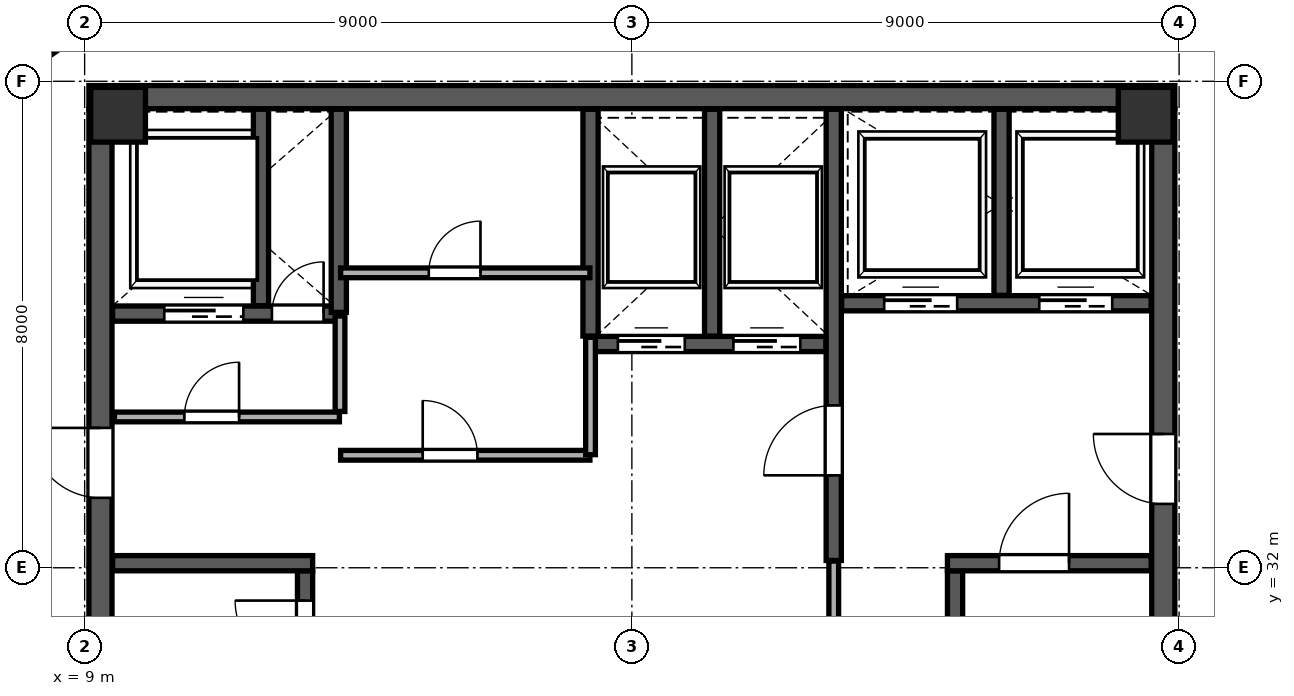
"""IFC4 building model, lengths in metres.
Left out: names, types, materials, properties, quantities, classifications, styles, units other than length and angle.
Written with IfcOpenShell. Run it as: python <this file> out.ifc"""

import sys

from ifc_helpers import new_model, si_unit, direction, frame, frame_2d, origin, origin_2d, place, context, subcontext, project, spatial, rectangle, extrude, source, transform, mapped, element, fill, save


model = new_model("IFC4")
c1 = context("Model", 3, precision=1e-05, world=origin(), true_north=direction((0.0, 1.0)))
c2 = subcontext(c1, "Body", "Model", "MODEL_VIEW")
j1 = project(units=[si_unit("LENGTHUNIT", "METRE"), si_unit("PLANEANGLEUNIT", "RADIAN")], contexts=[c1])
p1 = place(None, origin())
s1 = spatial("IfcSite", under=j1, at=p1, CompositionType="ELEMENT")
p2 = place(p1, origin())
s2 = spatial("IfcBuilding", under=s1, at=p2, CompositionType="ELEMENT")
p3 = place(p2, frame((0.0, 0.0, 298.8)))
s3 = spatial("IfcBuildingStorey", under=s2, at=p3, CompositionType="ELEMENT", Elevation=298.8)
m1 = source(origin(), c2, "Body", "SweptSolid", [
    extrude(rectangle(XDim=0.9, YDim=0.9, at=origin_2d()), origin(), (0.0, 0.0, 1.0), 4.198),
])
for number, where, z_axis, x_axis in (
    (1, (9.55, 39.45, 0.001), (0.0, 0.0, 1.0), (1.0, 0.0, 0.0)),
    (2, (26.45, 39.45, 0.001), (0.0, 0.0, 1.0), (1.0, 0.0, 0.0)),
):
    element("IfcColumn", number, at=place(p3, frame(where, z_axis=z_axis, x_axis=x_axis)), inside=s3, PredefinedType="COLUMN", context=c2, shape_type="MappedRepresentation", body=[
        mapped(m1, transform((0.0, 0.0, 0.0), scale=1.0)),
    ])
p4 = place(p3, frame((9.26, 24.45, 0.0), z_axis=(0.0, 0.0, 1.0), x_axis=(0.0, 1.0, 0.0)))
e3 = element("IfcWall", 3, at=p4, inside=s3, PredefinedType="SHEAR", context=c2, shape_type="SweptSolid", body=[
    extrude(rectangle(XDim=15.1, YDim=0.38, at=frame_2d((7.55, 0.0))), origin(), (0.0, 0.0, 1.0), 3.96),
])
p5 = place(p4, frame((8.7, 0.0, 0.0)))
e4 = element("IfcOpeningElement", 4, at=p5, cuts=e3, PredefinedType="OPENING", context=c2, shape_type="SweptSolid", body=[
    extrude(rectangle(XDim=1.15, YDim=2.2, at=frame_2d((0.575, 1.1))), frame((0.0, 0.2, 0.0), z_axis=(0.0, -1.0, 0.0), x_axis=(1.0, 0.0, 0.0)), (0.0, 0.0, 1.0), 0.4),
])
p6 = place(p3, frame((26.74, 24.45, 0.0), z_axis=(0.0, 0.0, 1.0), x_axis=(0.0, 1.0, 0.0)))
e5 = element("IfcWall", 5, at=p6, inside=s3, PredefinedType="SHEAR", context=c2, shape_type="SweptSolid", body=[
    extrude(rectangle(XDim=15.1, YDim=0.38, at=frame_2d((7.55, 0.0))), origin(), (0.0, 0.0, 1.0), 3.96),
])
p7 = place(p6, frame((8.6, 0.0, 0.0)))
e6 = element("IfcOpeningElement", 6, at=p7, cuts=e5, PredefinedType="OPENING", context=c2, shape_type="SweptSolid", body=[
    extrude(rectangle(XDim=1.15, YDim=2.2, at=frame_2d((0.575, 1.1))), frame((0.0, 0.2, 0.0), z_axis=(0.0, -1.0, 0.0), x_axis=(1.0, 0.0, 0.0)), (0.0, 0.0, 1.0), 0.4),
])
p8 = place(p3, frame((9.07, 39.74, 0.0), z_axis=(0.0, 0.0, 1.0), x_axis=(1.0, 0.0, 0.0)))
e7 = element("IfcWall", 7, at=p8, inside=s3, PredefinedType="SHEAR", context=c2, shape_type="SweptSolid", body=[
    extrude(rectangle(XDim=17.86, YDim=0.38, at=frame_2d((8.93, 0.0))), origin(), (0.0, 0.0, 1.0), 3.96),
])
p9 = place(p3, frame((12.625, 24.46, 0.0), z_axis=(0.0, 0.0, 1.0), x_axis=(0.0, 1.0, 0.0)))
e8 = element("IfcWall", 8, at=p9, inside=s3, PredefinedType="SHEAR", context=c2, shape_type="SweptSolid", body=[
    extrude(rectangle(XDim=7.49, YDim=0.25, at=frame_2d((3.745, 0.0))), origin(), (0.0, 0.0, 1.0), 3.96),
])
p10 = place(p9, frame((5.85, 0.0, 0.0)))
e9 = element("IfcOpeningElement", 9, at=p10, cuts=e8, PredefinedType="OPENING", context=c2, shape_type="SweptSolid", body=[
    extrude(rectangle(XDim=1.15, YDim=2.2, at=frame_2d((0.575, 1.1))), frame((0.0, 0.135, 0.0), z_axis=(0.0, -1.0, 0.0), x_axis=(1.0, 0.0, 0.0)), (0.0, 0.0, 1.0), 0.27),
])
p11 = place(p3, frame((9.46, 32.075, 0.0), z_axis=(0.0, 0.0, 1.0), x_axis=(1.0, 0.0, 0.0)))
e10 = element("IfcWall", 10, at=p11, inside=s3, PredefinedType="SHEAR", context=c2, shape_type="SweptSolid", body=[
    extrude(rectangle(XDim=3.29, YDim=0.25, at=frame_2d((1.645, 0.0))), origin(), (0.0, 0.0, 1.0), 3.96),
])
p12 = place(p3, frame((23.315, 24.46, 0.0), z_axis=(0.0, 0.0, 1.0), x_axis=(0.0, 1.0, 0.0)))
e11 = element("IfcWall", 11, at=p12, inside=s3, PredefinedType="SHEAR", context=c2, shape_type="SweptSolid", body=[
    extrude(rectangle(XDim=7.49, YDim=0.25, at=frame_2d((3.745, 0.0))), origin(), (0.0, 0.0, 1.0), 3.96),
])
p13 = place(p3, frame((23.19, 32.075, 0.0), z_axis=(0.0, 0.0, 1.0), x_axis=(1.0, 0.0, 0.0)))
e12 = element("IfcWall", 12, at=p13, inside=s3, PredefinedType="SHEAR", context=c2, shape_type="SweptSolid", body=[
    extrude(rectangle(XDim=3.35, YDim=0.25, at=frame_2d((1.675, 0.0))), origin(), (0.0, 0.0, 1.0), 3.96),
])
p14 = place(p13, frame((0.85, 0.0, 0.0)))
e13 = element("IfcOpeningElement", 13, at=p14, cuts=e12, PredefinedType="OPENING", context=c2, shape_type="SweptSolid", body=[
    extrude(rectangle(XDim=1.15, YDim=2.2, at=frame_2d((0.575, 1.1))), frame((0.0, 0.135, 0.0), z_axis=(0.0, -1.0, 0.0), x_axis=(1.0, 0.0, 0.0)), (0.0, 0.0, 1.0), 0.27),
])
p15 = place(p3, frame((21.32, 32.12, 0.0), z_axis=(0.0, 0.0, 1.0), x_axis=(0.0, 1.0, 0.0)))
e14 = element("IfcWall", 14, at=p15, inside=s3, PredefinedType="SHEAR", context=c2, shape_type="SweptSolid", body=[
    extrude(rectangle(XDim=7.42, YDim=0.25, at=frame_2d((3.71, 0.0))), origin(), (0.0, 0.0, 1.0), 3.96),
])
p16 = place(p15, frame((1.4, 0.0, 0.0)))
e15 = element("IfcOpeningElement", 15, at=p16, cuts=e14, PredefinedType="OPENING", context=c2, shape_type="SweptSolid", body=[
    extrude(rectangle(XDim=1.15, YDim=2.2, at=frame_2d((0.575, 1.1))), frame((0.0, 0.135, 0.0), z_axis=(0.0, -1.0, 0.0), x_axis=(1.0, 0.0, 0.0)), (0.0, 0.0, 1.0), 0.27),
])
p17 = place(p3, frame((9.46, 36.18, 0.0), z_axis=(0.0, 0.0, 1.0), x_axis=(1.0, 0.0, 0.0)))
e16 = element("IfcWall", 16, at=p17, inside=s3, PredefinedType="SHEAR", context=c2, shape_type="SweptSolid", body=[
    extrude(rectangle(XDim=3.79, YDim=0.25, at=frame_2d((1.895, 0.0))), origin(), (0.0, 0.0, 1.0), 3.96),
])
p18 = place(p17, frame((2.62, 0.0, 0.0)))
e17 = element("IfcOpeningElement", 17, at=p18, cuts=e16, PredefinedType="OPENING", context=c2, shape_type="SweptSolid", body=[
    extrude(rectangle(XDim=0.85, YDim=2.1, at=frame_2d((0.425, 1.05))), frame((0.0, 0.135, 0.0), z_axis=(0.0, -1.0, 0.0), x_axis=(1.0, 0.0, 0.0)), (0.0, 0.0, 1.0), 0.27),
])
p19 = place(p17, frame((0.85, 0.0, 0.0)))
e18 = element("IfcOpeningElement", 18, at=p19, cuts=e16, PredefinedType="OPENING", context=c2, shape_type="SweptSolid", body=[
    extrude(rectangle(XDim=1.3, YDim=2.25, at=frame_2d((0.65, 1.125))), frame((0.0, 0.135, 0.0), z_axis=(0.0, -1.0, 0.0), x_axis=(1.0, 0.0, 0.0)), (0.0, 0.0, 1.0), 0.27),
])
p20 = place(p3, frame((11.9, 36.31, 0.0), z_axis=(0.0, 0.0, 1.0), x_axis=(0.0, 1.0, 0.0)))
e19 = element("IfcWall", 19, at=p20, inside=s3, PredefinedType="SHEAR", context=c2, shape_type="SweptSolid", body=[
    extrude(rectangle(XDim=3.23, YDim=0.25, at=frame_2d((1.615, 0.0))), origin(), (0.0, 0.0, 1.0), 3.96),
])
p21 = place(p3, frame((21.45, 36.35, 0.0), z_axis=(0.0, 0.0, 1.0), x_axis=(1.0, 0.0, 0.0)))
e20 = element("IfcWall", 20, at=p21, inside=s3, PredefinedType="SHEAR", context=c2, shape_type="SweptSolid", body=[
    extrude(rectangle(XDim=5.09, YDim=0.25, at=frame_2d((2.545, 0.0))), origin(), (0.0, 0.0, 1.0), 3.96),
])
p22 = place(p21, frame((0.7, 0.0, 0.0)))
e21 = element("IfcOpeningElement", 21, at=p22, cuts=e20, PredefinedType="OPENING", context=c2, shape_type="SweptSolid", body=[
    extrude(rectangle(XDim=1.2, YDim=2.2, at=frame_2d((0.6, 1.1))), frame((0.0, 0.135, 0.0), z_axis=(0.0, -1.0, 0.0), x_axis=(1.0, 0.0, 0.0)), (0.0, 0.0, 1.0), 0.27),
])
p23 = place(p21, frame((3.25, 0.0, 0.0)))
e22 = element("IfcOpeningElement", 22, at=p23, cuts=e20, PredefinedType="OPENING", context=c2, shape_type="SweptSolid", body=[
    extrude(rectangle(XDim=1.2, YDim=2.2, at=frame_2d((0.6, 1.1))), frame((0.0, 0.135, 0.0), z_axis=(0.0, -1.0, 0.0), x_axis=(1.0, 0.0, 0.0)), (0.0, 0.0, 1.0), 0.27),
])
p24 = place(p3, frame((24.08, 36.48, 0.0), z_axis=(0.0, 0.0, 1.0), x_axis=(0.0, 1.0, 0.0)))
e23 = element("IfcWall", 23, at=p24, inside=s3, PredefinedType="SHEAR", context=c2, shape_type="SweptSolid", body=[
    extrude(rectangle(XDim=3.06, YDim=0.25, at=frame_2d((1.53, 0.0))), origin(), (0.0, 0.0, 1.0), 3.96),
])
p25 = place(p3, frame((13.18, 36.2, 0.0), z_axis=(0.0, 0.0, 1.0), x_axis=(0.0, 1.0, 0.0)))
e24 = element("IfcWall", 24, at=p25, inside=s3, PredefinedType="SHEAR", context=c2, shape_type="SweptSolid", body=[
    extrude(rectangle(XDim=3.34, YDim=0.25, at=frame_2d((1.67, 0.0))), origin(), (0.0, 0.0, 1.0), 3.96),
])
p26 = place(p3, frame((17.32, 35.68, 0.0), z_axis=(0.0, 0.0, 1.0), x_axis=(1.0, 0.0, 0.0)))
e25 = element("IfcWall", 25, at=p26, inside=s3, PredefinedType="SHEAR", context=c2, shape_type="SweptSolid", body=[
    extrude(rectangle(XDim=3.87, YDim=0.25, at=frame_2d((1.935, 0.0))), origin(), (0.0, 0.0, 1.0), 3.96),
])
p27 = place(p26, frame((0.45, 0.0, 0.0)))
e26 = element("IfcOpeningElement", 26, at=p27, cuts=e25, PredefinedType="OPENING", context=c2, shape_type="SweptSolid", body=[
    extrude(rectangle(XDim=1.1, YDim=2.2, at=frame_2d((0.55, 1.1))), frame((0.0, 0.135, 0.0), z_axis=(0.0, -1.0, 0.0), x_axis=(1.0, 0.0, 0.0)), (0.0, 0.0, 1.0), 0.27),
])
p28 = place(p26, frame((2.35, 0.0, 0.0)))
e27 = element("IfcOpeningElement", 27, at=p28, cuts=e25, PredefinedType="OPENING", context=c2, shape_type="SweptSolid", body=[
    extrude(rectangle(XDim=1.1, YDim=2.2, at=frame_2d((0.55, 1.1))), frame((0.0, 0.135, 0.0), z_axis=(0.0, -1.0, 0.0), x_axis=(1.0, 0.0, 0.0)), (0.0, 0.0, 1.0), 0.27),
])
for number, where, z_axis, x_axis in (
    (28, (17.32, 35.81, 0.0), (0.0, 0.0, 1.0), (0.0, 1.0, 0.0)),
    (29, (19.32, 35.81, 0.0), (0.0, 0.0, 1.0), (0.0, 1.0, 0.0)),
):
    element("IfcWall", number, at=place(p3, frame(where, z_axis=z_axis, x_axis=x_axis)), inside=s3, PredefinedType="SHEAR", context=c2, shape_type="SweptSolid", body=[
        extrude(rectangle(XDim=3.73, YDim=0.25, at=frame_2d((1.865, 0.0))), origin(), (0.0, 0.0, 1.0), 3.96),
    ])
p29 = place(p3, frame((9.49, 34.48, 0.0), z_axis=(0.0, 0.0, 1.0), x_axis=(1.0, 0.0, 0.0)))
e30 = element("IfcWall", 30, at=p29, inside=s3, PredefinedType="PARTITIONING", context=c2, shape_type="SweptSolid", body=[
    extrude(rectangle(XDim=3.7, YDim=0.16, at=frame_2d((1.85, 0.0))), origin(), (0.0, 0.0, 1.0), 3.96),
])
p30 = place(p29, frame((1.15, 0.0, 0.0)))
e31 = element("IfcOpeningElement", 31, at=p30, cuts=e30, PredefinedType="OPENING", context=c2, shape_type="SweptSolid", body=[
    extrude(rectangle(XDim=0.9, YDim=2.15, at=frame_2d((0.45, 1.075))), frame((0.0, 0.09, 0.0), z_axis=(0.0, -1.0, 0.0), x_axis=(1.0, 0.0, 0.0)), (0.0, 0.0, 1.0), 0.18),
])
p31 = place(p3, frame((13.2, 34.57, 0.0), z_axis=(0.0, 0.0, 1.0), x_axis=(0.0, 1.0, 0.0)))
e32 = element("IfcWall", 32, at=p31, inside=s3, PredefinedType="PARTITIONING", context=c2, shape_type="SweptSolid", body=[
    extrude(rectangle(XDim=1.57, YDim=0.16, at=frame_2d((0.785, 0.0))), origin(), (0.0, 0.0, 1.0), 3.96),
])
p32 = place(p3, frame((13.21, 33.85, 0.0), z_axis=(0.0, 0.0, 1.0), x_axis=(1.0, 0.0, 0.0)))
e33 = element("IfcWall", 33, at=p32, inside=s3, PredefinedType="PARTITIONING", context=c2, shape_type="SweptSolid", body=[
    extrude(rectangle(XDim=4.1, YDim=0.16, at=frame_2d((2.05, 0.0))), origin(), (0.0, 0.0, 1.0), 3.96),
])
p33 = place(p32, frame((1.35, 0.0, 0.0)))
e34 = element("IfcOpeningElement", 34, at=p33, cuts=e33, PredefinedType="OPENING", context=c2, shape_type="SweptSolid", body=[
    extrude(rectangle(XDim=0.9, YDim=2.15, at=frame_2d((0.45, 1.075))), frame((0.0, 0.09, 0.0), z_axis=(0.0, -1.0, 0.0), x_axis=(1.0, 0.0, 0.0)), (0.0, 0.0, 1.0), 0.18),
])
p34 = place(p3, frame((17.32, 33.86, 0.0), z_axis=(0.0, 0.0, 1.0), x_axis=(0.0, 1.0, 0.0)))
e35 = element("IfcWall", 35, at=p34, inside=s3, PredefinedType="PARTITIONING", context=c2, shape_type="SweptSolid", body=[
    extrude(rectangle(XDim=1.93, YDim=0.16, at=frame_2d((0.965, 0.0))), origin(), (0.0, 0.0, 1.0), 3.96),
])
p35 = place(p3, frame((13.21, 36.85, 0.0), z_axis=(0.0, 0.0, 1.0), x_axis=(1.0, 0.0, 0.0)))
e36 = element("IfcWall", 36, at=p35, inside=s3, PredefinedType="PARTITIONING", context=c2, shape_type="SweptSolid", body=[
    extrude(rectangle(XDim=4.1, YDim=0.16, at=frame_2d((2.05, 0.0))), origin(), (0.0, 0.0, 1.0), 3.96),
])
p36 = place(p35, frame((1.45, 0.0, 0.0)))
e37 = element("IfcOpeningElement", 37, at=p36, cuts=e36, PredefinedType="OPENING", context=c2, shape_type="SweptSolid", body=[
    extrude(rectangle(XDim=0.85, YDim=2.1, at=frame_2d((0.425, 1.05))), frame((0.0, 0.09, 0.0), z_axis=(0.0, -1.0, 0.0), x_axis=(1.0, 0.0, 0.0)), (0.0, 0.0, 1.0), 0.18),
])
p37 = place(p3, frame((21.32, 29.19, 0.0), z_axis=(0.0, 0.0, 1.0), x_axis=(0.0, 1.0, 0.0)))
e38 = element("IfcWall", 38, at=p37, inside=s3, PredefinedType="PARTITIONING", context=c2, shape_type="SweptSolid", body=[
    extrude(rectangle(XDim=2.92, YDim=0.16, at=frame_2d((1.46, 0.0))), origin(), (0.0, 0.0, 1.0), 3.96),
])
p38 = place(p3, frame((21.918, 49.884, 0.0), z_axis=(0.0, 0.0, 1.0), x_axis=(0.57358495776, -0.819146077468, 0.0)))
e39 = element("IfcWall", 39, at=p38, inside=s3, PredefinedType="PARTITIONING", context=c2, shape_type="SweptSolid", body=[
    extrude(rectangle(XDim=25.79, YDim=0.1, at=frame_2d((12.895, 0.0))), origin(), (0.0, 0.0, 1.0), 3.96),
])
p39 = place(p38, frame((9.2, 0.0, 0.0)))
e40 = element("IfcOpeningElement", 40, at=p39, cuts=e39, PredefinedType="OPENING", context=c2, shape_type="SweptSolid", body=[
    extrude(rectangle(XDim=0.95, YDim=2.15, at=frame_2d((0.475, 1.075))), frame((0.0, 0.06, 0.0), z_axis=(0.0, -1.0, 0.0), x_axis=(1.0, 0.0, 0.0)), (0.0, 0.0, 1.0), 0.12),
])
p40 = place(p3, frame((2.071, 36.036, 0.0), z_axis=(0.0, 0.0, 1.0), x_axis=(0.819154854942, 0.573572422302, 0.0)))
e41 = element("IfcWall", 41, at=p40, inside=s3, PredefinedType="PARTITIONING", context=c2, shape_type="SweptSolid", body=[
    extrude(rectangle(XDim=29.62, YDim=0.115, at=frame_2d((14.81, 0.0))), origin(), (0.0, 0.0, 1.0), 3.96),
])
p41 = place(p40, frame((4.2, 0.0, 0.0)))
e42 = element("IfcOpeningElement", 42, at=p41, cuts=e41, PredefinedType="OPENING", context=c2, shape_type="SweptSolid", body=[
    extrude(rectangle(XDim=0.95, YDim=2.15, at=frame_2d((0.475, 1.075))), frame((0.0, 0.067, 0.0), z_axis=(0.0, -1.0, 0.0), x_axis=(1.0, 0.0, 0.0)), (0.0, 0.0, 1.0), 0.135),
])
m2 = source(origin(), c2, "Body", "SweptSolid", [
    extrude(rectangle(XDim=1.15, YDim=2.2, at=frame_2d((0.575, 1.1))), frame((0.0, 0.025, 0.0), z_axis=(0.0, -1.0, 0.0), x_axis=(1.0, 0.0, 0.0)), (0.0, 0.0, 1.0), 0.05),
])
p42 = place(p10, origin())
e43 = element("IfcDoor", 43, at=p42, inside=s3, OperationType="SINGLE_SWING_RIGHT", PredefinedType="DOOR", context=c2, shape_type="MappedRepresentation", body=[
    mapped(m2, transform((0.0, 0.0, 0.0), scale=1.0)),
])
fill(e9, e43)
m3 = source(origin(), c2, "Body", "SweptSolid", [
    extrude(rectangle(XDim=1.15, YDim=2.2, at=frame_2d((0.575, 1.1))), frame((0.0, 0.025, 0.0), z_axis=(0.0, -1.0, 0.0), x_axis=(1.0, 0.0, 0.0)), (0.0, 0.0, 1.0), 0.05),
])
p43 = place(p16, origin())
e44 = element("IfcDoor", 44, at=p43, inside=s3, OperationType="SINGLE_SWING_LEFT", PredefinedType="DOOR", context=c2, shape_type="MappedRepresentation", body=[
    mapped(m3, transform((0.0, 0.0, 0.0), scale=1.0)),
])
fill(e15, e44)
p44 = place(p14, origin())
e45 = element("IfcDoor", 45, at=p44, inside=s3, OperationType="SINGLE_SWING_RIGHT", PredefinedType="DOOR", context=c2, shape_type="MappedRepresentation", body=[
    mapped(m2, transform((0.0, 0.0, 0.0), scale=1.0)),
])
fill(e13, e45)
p45 = place(p7, origin())
e46 = element("IfcDoor", 46, at=p45, inside=s3, OperationType="SINGLE_SWING_RIGHT", PredefinedType="DOOR", context=c2, shape_type="MappedRepresentation", body=[
    mapped(m3, transform((0.0, 0.0, 0.0), scale=1.0)),
])
fill(e6, e46)
p46 = place(p5, origin())
e47 = element("IfcDoor", 47, at=p46, inside=s3, OperationType="SINGLE_SWING_RIGHT", PredefinedType="DOOR", context=c2, shape_type="MappedRepresentation", body=[
    mapped(m3, transform((0.0, 0.0, 0.0), scale=1.0)),
])
fill(e4, e47)
m4 = source(origin(), c2, "Body", "SweptSolid", [
    extrude(rectangle(XDim=0.85, YDim=2.1, at=frame_2d((0.425, 1.05))), frame((0.0, 0.025, 0.0), z_axis=(0.0, -1.0, 0.0), x_axis=(1.0, 0.0, 0.0)), (0.0, 0.0, 1.0), 0.05),
])
p47 = place(p18, origin())
e48 = element("IfcDoor", 48, at=p47, inside=s3, OperationType="SINGLE_SWING_RIGHT", PredefinedType="DOOR", context=c2, shape_type="MappedRepresentation", body=[
    mapped(m4, transform((0.0, 0.0, 0.0), scale=1.0)),
])
fill(e17, e48)
m5 = source(origin(), c2, "Body", "SweptSolid", [
    extrude(rectangle(XDim=1.1, YDim=2.2, at=frame_2d((0.55, 1.1))), frame((0.0, 0.025, 0.0), z_axis=(0.0, -1.0, 0.0), x_axis=(1.0, 0.0, 0.0)), (0.0, 0.0, 1.0), 0.05),
])
p48 = place(p27, origin())
e49 = element("IfcDoor", 49, at=p48, inside=s3, OperationType="SLIDING_TO_LEFT", PredefinedType="DOOR", context=c2, shape_type="MappedRepresentation", body=[
    mapped(m5, transform((0.0, 0.0, 0.0), scale=1.0)),
])
fill(e26, e49)
p49 = place(p28, origin())
e50 = element("IfcDoor", 50, at=p49, inside=s3, OperationType="SLIDING_TO_RIGHT", PredefinedType="DOOR", context=c2, shape_type="MappedRepresentation", body=[
    mapped(m5, transform((0.0, 0.0, 0.0), scale=1.0)),
])
fill(e27, e50)
m6 = source(origin(), c2, "Body", "SweptSolid", [
    extrude(rectangle(XDim=1.2, YDim=2.2, at=frame_2d((0.6, 1.1))), frame((0.0, 0.025, 0.0), z_axis=(0.0, -1.0, 0.0), x_axis=(1.0, 0.0, 0.0)), (0.0, 0.0, 1.0), 0.05),
])
p50 = place(p22, origin())
e51 = element("IfcDoor", 51, at=p50, inside=s3, OperationType="SLIDING_TO_LEFT", PredefinedType="DOOR", context=c2, shape_type="MappedRepresentation", body=[
    mapped(m6, transform((0.0, 0.0, 0.0), scale=1.0)),
])
fill(e21, e51)
p51 = place(p23, origin())
e52 = element("IfcDoor", 52, at=p51, inside=s3, OperationType="SLIDING_TO_RIGHT", PredefinedType="DOOR", context=c2, shape_type="MappedRepresentation", body=[
    mapped(m6, transform((0.0, 0.0, 0.0), scale=1.0)),
])
fill(e22, e52)
m7 = source(origin(), c2, "Body", "SweptSolid", [
    extrude(rectangle(XDim=1.3, YDim=2.25, at=frame_2d((0.65, 1.125))), frame((0.0, 0.025, 0.0), z_axis=(0.0, -1.0, 0.0), x_axis=(1.0, 0.0, 0.0)), (0.0, 0.0, 1.0), 0.05),
])
p52 = place(p19, origin())
e53 = element("IfcDoor", 53, at=p52, inside=s3, OperationType="SLIDING_TO_LEFT", PredefinedType="DOOR", context=c2, shape_type="MappedRepresentation", body=[
    mapped(m7, transform((0.0, 0.0, 0.0), scale=1.0)),
])
fill(e18, e53)
m8 = source(origin(), c2, "Body", "SweptSolid", [
    extrude(rectangle(XDim=0.9, YDim=2.15, at=frame_2d((0.45, 1.075))), frame((0.0, 0.025, 0.0), z_axis=(0.0, -1.0, 0.0), x_axis=(1.0, 0.0, 0.0)), (0.0, 0.0, 1.0), 0.05),
])
p53 = place(p30, origin())
e54 = element("IfcDoor", 54, at=p53, inside=s3, OperationType="SINGLE_SWING_RIGHT", PredefinedType="DOOR", context=c2, shape_type="MappedRepresentation", body=[
    mapped(m8, transform((0.0, 0.0, 0.0), scale=1.0)),
])
fill(e31, e54)
p54 = place(p33, origin())
e55 = element("IfcDoor", 55, at=p54, inside=s3, OperationType="SINGLE_SWING_LEFT", PredefinedType="DOOR", context=c2, shape_type="MappedRepresentation", body=[
    mapped(m8, transform((0.0, 0.0, 0.0), scale=1.0)),
])
fill(e34, e55)
p55 = place(p36, origin())
e56 = element("IfcDoor", 56, at=p55, inside=s3, OperationType="SINGLE_SWING_RIGHT", PredefinedType="DOOR", context=c2, shape_type="MappedRepresentation", body=[
    mapped(m4, transform((0.0, 0.0, 0.0), scale=1.0)),
])
fill(e37, e56)
save(model, sys.argv[1])
